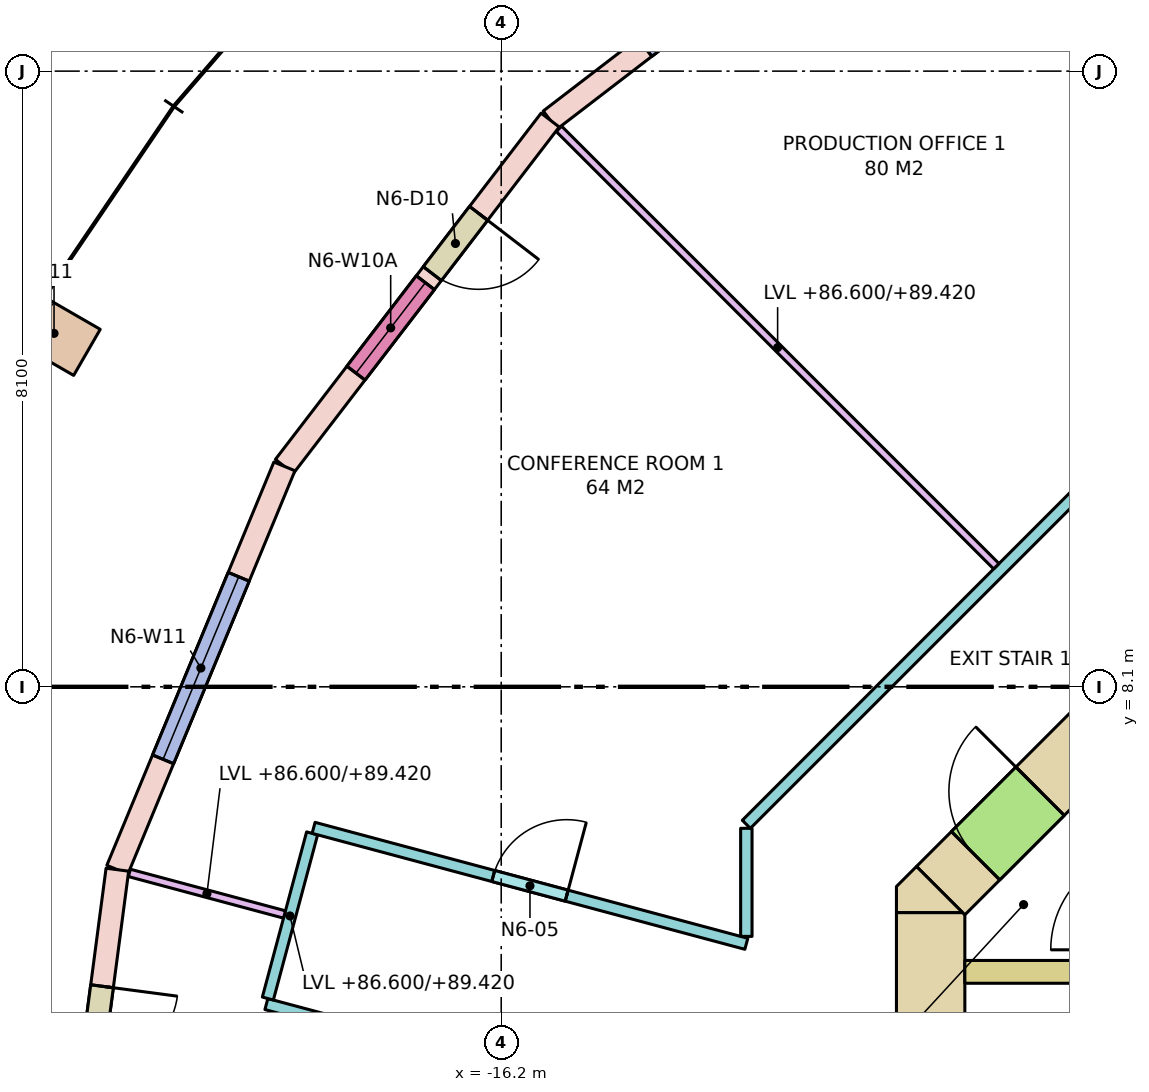
"""IFC4 building model, lengths in metres.
Left out: names, types, materials, properties, quantities, classifications, styles, units other than length and angle.
Written with IfcOpenShell. Run it as: python <this file> out.ifc"""

import sys

from ifc_helpers import new_model, si_unit, direction, frame, frame_2d, origin, origin_2d, place, context, subcontext, project, spatial, polyline, rectangle, outline, extrude, element, fill, save


model = new_model("IFC4")
c1 = context("Model", 3, precision=1e-05, world=origin(), true_north=direction((0.0, 1.0)))
c2 = subcontext(c1, "Body", "Model", "MODEL_VIEW")
j1 = project(units=[si_unit("LENGTHUNIT", "METRE"), si_unit("PLANEANGLEUNIT", "RADIAN")], contexts=[c1])
p1 = place(None, origin())
s1 = spatial("IfcSite", under=j1, at=p1, CompositionType="ELEMENT")
p2 = place(p1, origin())
s2 = spatial("IfcBuilding", under=s1, at=p2, CompositionType="ELEMENT")
p3 = place(p2, frame((0.0, 0.0, 86.6)))
s3 = spatial("IfcBuildingStorey", under=s2, at=p3, CompositionType="ELEMENT", Elevation=86.6)
p4 = place(p3, frame((-22.084, 12.75, 0.0), z_axis=(0.0, 0.0, 1.0), x_axis=(-0.5, -0.866025403784, 0.0)))
e1 = element("IfcColumn", 1, at=p4, inside=s3, PredefinedType="COLUMN", context=c2, shape_type="SweptSolid", body=[
    extrude(rectangle(XDim=0.7, YDim=1.0, at=origin_2d()), origin(), (0.0, 0.0, 1.0), 4.0),
])
p5 = place(p3, frame((-10.55, -5.13, -0.28), z_axis=(0.0, 0.0, 1.0), x_axis=(0.0, 1.0, 0.0)))
e2 = element("IfcWall", 2, at=p5, inside=s3, PredefinedType="SHEAR", context=c2, shape_type="SweptSolid", body=[
    extrude(rectangle(XDim=10.26, YDim=0.9, at=frame_2d((5.13, 0.0))), origin(), (0.0, 0.0, 1.0), 4.0),
])
p6 = place(p5, frame((4.13, 0.0, 0.28)))
e3 = element("IfcOpeningElement", 3, at=p6, cuts=e2, PredefinedType="OPENING", context=c2, shape_type="SweptSolid", body=[
    extrude(rectangle(XDim=2.0, YDim=2.1, at=frame_2d((1.0, 1.05))), frame((0.0, 0.46, 0.0), z_axis=(0.0, -1.0, 0.0), x_axis=(1.0, 0.0, 0.0)), (0.0, 0.0, 1.0), 0.92),
])
p7 = place(p3, frame((-10.418, 5.418, -0.28), z_axis=(0.0, 0.0, 1.0), x_axis=(0.707106781187, 0.707106781187, 0.0)))
e4 = element("IfcWall", 4, at=p7, inside=s3, PredefinedType="SHEAR", context=c2, shape_type="SweptSolid", body=[
    extrude(rectangle(XDim=4.243, YDim=0.9, at=frame_2d((2.121, 0.0))), origin(), (0.0, 0.0, 1.0), 4.0),
])
p8 = place(p7, frame((0.65, 0.0, 0.28)))
e5 = element("IfcOpeningElement", 5, at=p8, cuts=e4, PredefinedType="OPENING", context=c2, shape_type="SweptSolid", body=[
    extrude(rectangle(XDim=1.2, YDim=2.1, at=frame_2d((0.6, 1.05))), frame((0.0, 0.46, 0.0), z_axis=(0.0, -1.0, 0.0), x_axis=(1.0, 0.0, 0.0)), (0.0, 0.0, 1.0), 0.92),
])
p9 = place(p3, frame((0.0, 0.0, -0.28)))
e6 = element("IfcWall", 6, at=p9, inside=s3, PredefinedType="SHEAR", context=c2, shape_type="SweptSolid", body=[
    extrude(outline(polyline([(-10.736, 5.736), (-10.13, 5.13), (-11.0, 5.13), (-11.0, 5.473), (-10.736, 5.736)])), origin(), (0.0, 0.0, 1.0), 4.0),
])
p10 = place(p3, frame((-10.1, 4.35, 0.0), z_axis=(0.0, 0.0, 1.0), x_axis=(1.0, 0.0, 0.0)))
e7 = element("IfcWall", 7, at=p10, inside=s3, PredefinedType="SOLIDWALL", context=c2, shape_type="SweptSolid", body=[
    extrude(rectangle(XDim=8.1, YDim=0.3, at=frame_2d((4.05, 0.0))), origin(), (0.0, 0.0, 1.0), 3.72),
])
p11 = place(p3, frame((-11.0, 19.052, 0.0), z_axis=(0.0, 0.0, 1.0), x_axis=(-0.793366142647, -0.608744744291, 0.0)))
e8 = element("IfcWall", 8, at=p11, inside=s3, PredefinedType="STANDARD", context=c2, shape_type="SweptSolid", body=[
    extrude(rectangle(XDim=5.743, YDim=0.3, at=frame_2d((2.872, 0.0))), origin(), (0.0, 0.0, 1.0), 3.72),
])
p12 = place(p11, frame((1.572, 0.0, 0.8)))
e9 = element("IfcOpeningElement", 9, at=p12, cuts=e8, PredefinedType="OPENING", context=c2, shape_type="SweptSolid", body=[
    extrude(rectangle(XDim=2.6, YDim=2.7, at=frame_2d((1.3, 1.35))), frame((0.0, 0.16, 0.0), z_axis=(0.0, -1.0, 0.0), x_axis=(1.0, 0.0, 0.0)), (0.0, 0.0, 1.0), 0.32),
])
p13 = place(p3, frame((-15.556, 15.556, 0.0), z_axis=(0.0, 0.0, 1.0), x_axis=(-0.608744744291, -0.793366142647, 0.0)))
e10 = element("IfcWall", 10, at=p13, inside=s3, PredefinedType="STANDARD", context=c2, shape_type="SweptSolid", body=[
    extrude(rectangle(XDim=5.743, YDim=0.3, at=frame_2d((2.872, 0.0))), origin(), (0.0, 0.0, 1.0), 3.72),
])
p14 = place(p13, frame((1.547, 0.0, 0.0)))
e11 = element("IfcOpeningElement", 11, at=p14, cuts=e10, PredefinedType="OPENING", context=c2, shape_type="SweptSolid", body=[
    extrude(rectangle(XDim=1.0, YDim=2.4, at=frame_2d((0.5, 1.2))), frame((0.0, 0.16, 0.0), z_axis=(0.0, -1.0, 0.0), x_axis=(1.0, 0.0, 0.0)), (0.0, 0.0, 1.0), 0.32),
])
p15 = place(p13, frame((2.697, 0.0, 0.8)))
e12 = element("IfcOpeningElement", 12, at=p15, cuts=e10, PredefinedType="OPENING", context=c2, shape_type="SweptSolid", body=[
    extrude(rectangle(XDim=1.5, YDim=2.7, at=frame_2d((0.75, 1.35))), frame((0.0, 0.16, 0.0), z_axis=(0.0, -1.0, 0.0), x_axis=(1.0, 0.0, 0.0)), (0.0, 0.0, 1.0), 0.32),
])
p16 = place(p3, frame((-19.052, 11.0, 0.0), z_axis=(0.0, 0.0, 1.0), x_axis=(-0.382715966503, -0.923866055759, 0.0)))
e13 = element("IfcWall", 13, at=p16, inside=s3, PredefinedType="STANDARD", context=c2, shape_type="SweptSolid", body=[
    extrude(rectangle(XDim=5.743, YDim=0.3, at=frame_2d((2.872, 0.0))), origin(), (0.0, 0.0, 1.0), 3.72),
])
p17 = place(p16, frame((1.572, 0.0, 0.8)))
e14 = element("IfcOpeningElement", 14, at=p17, cuts=e13, PredefinedType="OPENING", context=c2, shape_type="SweptSolid", body=[
    extrude(rectangle(XDim=2.6, YDim=2.7, at=frame_2d((1.3, 1.35))), frame((0.0, 0.16, 0.0), z_axis=(0.0, -1.0, 0.0), x_axis=(1.0, 0.0, 0.0)), (0.0, 0.0, 1.0), 0.32),
])
p18 = place(p3, frame((-21.25, 5.694, 0.0), z_axis=(0.0, 0.0, 1.0), x_axis=(-0.130503995834, -0.991447783331, 0.0)))
e15 = element("IfcWall", 15, at=p18, inside=s3, PredefinedType="STANDARD", context=c2, shape_type="SweptSolid", body=[
    extrude(rectangle(XDim=5.743, YDim=0.3, at=frame_2d((2.872, 0.0))), origin(), (0.0, 0.0, 1.0), 3.72),
])
p19 = place(p18, frame((1.547, 0.0, 0.0)))
e16 = element("IfcOpeningElement", 16, at=p19, cuts=e15, PredefinedType="OPENING", context=c2, shape_type="SweptSolid", body=[
    extrude(rectangle(XDim=1.0, YDim=2.4, at=frame_2d((0.5, 1.2))), frame((0.0, 0.16, 0.0), z_axis=(0.0, -1.0, 0.0), x_axis=(1.0, 0.0, 0.0)), (0.0, 0.0, 1.0), 0.32),
])
p20 = place(p18, frame((2.697, 0.0, 0.8)))
e17 = element("IfcOpeningElement", 17, at=p20, cuts=e15, PredefinedType="OPENING", context=c2, shape_type="SweptSolid", body=[
    extrude(rectangle(XDim=1.5, YDim=2.7, at=frame_2d((0.75, 1.35))), frame((0.0, 0.16, 0.0), z_axis=(0.0, -1.0, 0.0), x_axis=(1.0, 0.0, 0.0)), (0.0, 0.0, 1.0), 0.32),
])
p21 = place(p3, frame((-13.045, 2.253, 0.0), z_axis=(0.0, 0.0, 1.0), x_axis=(-0.965934061797, 0.258788307811, 0.0)))
e18 = element("IfcWall", 18, at=p21, inside=s3, PredefinedType="PARTITIONING", context=c2, shape_type="SweptSolid", body=[
    extrude(rectangle(XDim=6.465, YDim=0.15, at=frame_2d((3.232, 0.0))), origin(), (0.0, 0.0, 1.0), 3.72),
])
p22 = place(p3, frame((-19.271, 3.999, 0.0), z_axis=(0.0, 0.0, 1.0), x_axis=(0.258891558609, 0.965906393436, 0.0)))
e19 = element("IfcWall", 19, at=p22, inside=s3, PredefinedType="PARTITIONING", context=c2, shape_type="SweptSolid", body=[
    extrude(rectangle(XDim=2.25, YDim=0.15, at=frame_2d((1.125, 0.0))), origin(), (0.0, 0.0, 1.0), 2.82),
])
p23 = place(p3, frame((-18.669, 6.245, 0.0), z_axis=(0.0, 0.0, 1.0), x_axis=(0.965924201797, -0.258825107715, 0.0)))
e20 = element("IfcWall", 20, at=p23, inside=s3, PredefinedType="PARTITIONING", context=c2, shape_type="SweptSolid", body=[
    extrude(rectangle(XDim=5.895, YDim=0.15, at=frame_2d((2.947, 0.0))), origin(), (0.0, 0.0, 1.0), 3.72),
])
p24 = place(p23, frame((2.447, 0.0, 0.0)))
e21 = element("IfcOpeningElement", 21, at=p24, cuts=e20, PredefinedType="OPENING", context=c2, shape_type="SweptSolid", body=[
    extrude(rectangle(XDim=1.0, YDim=2.1, at=frame_2d((0.5, 1.05))), frame((0.0, 0.085, 0.0), z_axis=(0.0, -1.0, 0.0), x_axis=(1.0, 0.0, 0.0)), (0.0, 0.0, 1.0), 0.17),
])
p25 = place(p3, frame((-12.975, 4.816, 0.0), z_axis=(0.0, 0.0, 1.0), x_axis=(0.0, 1.0, 0.0)))
e22 = element("IfcWall", 22, at=p25, inside=s3, PredefinedType="PARTITIONING", context=c2, shape_type="SweptSolid", body=[
    extrude(rectangle(XDim=1.422, YDim=0.15, at=frame_2d((0.711, 0.0))), origin(), (0.0, 0.0, 1.0), 3.72),
])
p26 = place(p3, frame((-12.975, 6.291, 0.0), z_axis=(0.0, 0.0, 1.0), x_axis=(0.707125355289, 0.707088206597, 0.0)))
e23 = element("IfcWall", 23, at=p26, inside=s3, PredefinedType="PARTITIONING", context=c2, shape_type="SweptSolid", body=[
    extrude(rectangle(XDim=6.572, YDim=0.15, at=frame_2d((3.286, 0.0))), origin(), (0.0, 0.0, 1.0), 2.82),
])
p27 = place(p3, frame((-9.686, 9.686, 0.0), z_axis=(0.0, 0.0, 1.0), x_axis=(-0.707106781187, 0.707106781187, 0.0)))
e24 = element("IfcWall", 24, at=p27, inside=s3, PredefinedType="PARTITIONING", context=c2, shape_type="SweptSolid", body=[
    extrude(rectangle(XDim=8.139, YDim=0.1, at=frame_2d((4.069, 0.0))), origin(), (0.0, 0.0, 1.0), 2.82),
])
p28 = place(p3, frame((-19.052, 5.105, 0.0), z_axis=(0.0, 0.0, 1.0), x_axis=(-0.965927422152, 0.258813089189, 0.0)))
e25 = element("IfcWall", 25, at=p28, inside=s3, PredefinedType="PARTITIONING", context=c2, shape_type="SweptSolid", body=[
    extrude(rectangle(XDim=2.113, YDim=0.1, at=frame_2d((1.057, 0.0))), origin(), (0.0, 0.0, 1.0), 2.82),
])
p29 = place(p14, origin())
e26 = element("IfcDoor", 26, at=p29, inside=s3, OperationType="SINGLE_SWING_LEFT", PredefinedType="DOOR", context=c2, shape_type="SweptSolid", body=[
    extrude(rectangle(XDim=1.0, YDim=2.4, at=frame_2d((0.5, 1.2))), frame((0.0, 0.025, 0.0), z_axis=(0.0, -1.0, 0.0), x_axis=(1.0, 0.0, 0.0)), (0.0, 0.0, 1.0), 0.05),
])
fill(e11, e26)
p30 = place(p15, origin())
e27 = element("IfcWindow", 27, at=p30, inside=s3, PartitioningType="SINGLE_PANEL", PredefinedType="WINDOW", context=c2, shape_type="SweptSolid", body=[
    extrude(rectangle(XDim=1.5, YDim=2.7, at=frame_2d((0.75, 1.35))), frame((0.0, 0.03, 0.0), z_axis=(0.0, -1.0, 0.0), x_axis=(1.0, 0.0, 0.0)), (0.0, 0.0, 1.0), 0.06),
])
fill(e12, e27)
p31 = place(p17, origin())
e28 = element("IfcWindow", 28, at=p31, inside=s3, PartitioningType="SINGLE_PANEL", PredefinedType="WINDOW", context=c2, shape_type="SweptSolid", body=[
    extrude(rectangle(XDim=2.6, YDim=2.7, at=frame_2d((1.3, 1.35))), frame((0.0, 0.03, 0.0), z_axis=(0.0, -1.0, 0.0), x_axis=(1.0, 0.0, 0.0)), (0.0, 0.0, 1.0), 0.06),
])
fill(e14, e28)
p32 = place(p19, origin())
e29 = element("IfcDoor", 29, at=p32, inside=s3, OperationType="SINGLE_SWING_LEFT", PredefinedType="DOOR", context=c2, shape_type="SweptSolid", body=[
    extrude(rectangle(XDim=1.0, YDim=2.4, at=frame_2d((0.5, 1.2))), frame((0.0, 0.025, 0.0), z_axis=(0.0, -1.0, 0.0), x_axis=(1.0, 0.0, 0.0)), (0.0, 0.0, 1.0), 0.05),
])
fill(e16, e29)
p33 = place(p8, origin())
e30 = element("IfcDoor", 30, at=p33, inside=s3, OperationType="SINGLE_SWING_RIGHT", PredefinedType="DOOR", context=c2, shape_type="SweptSolid", body=[
    extrude(rectangle(XDim=1.2, YDim=2.1, at=frame_2d((0.6, 1.05))), frame((0.0, 0.025, 0.0), z_axis=(0.0, -1.0, 0.0), x_axis=(1.0, 0.0, 0.0)), (0.0, 0.0, 1.0), 0.05),
])
fill(e5, e30)
p34 = place(p24, origin())
e31 = element("IfcDoor", 31, at=p34, inside=s3, OperationType="SINGLE_SWING_RIGHT", PredefinedType="DOOR", context=c2, shape_type="SweptSolid", body=[
    extrude(rectangle(XDim=1.0, YDim=2.1, at=frame_2d((0.5, 1.05))), frame((0.0, 0.025, 0.0), z_axis=(0.0, -1.0, 0.0), x_axis=(1.0, 0.0, 0.0)), (0.0, 0.0, 1.0), 0.05),
])
fill(e21, e31)
save(model, sys.argv[1])
